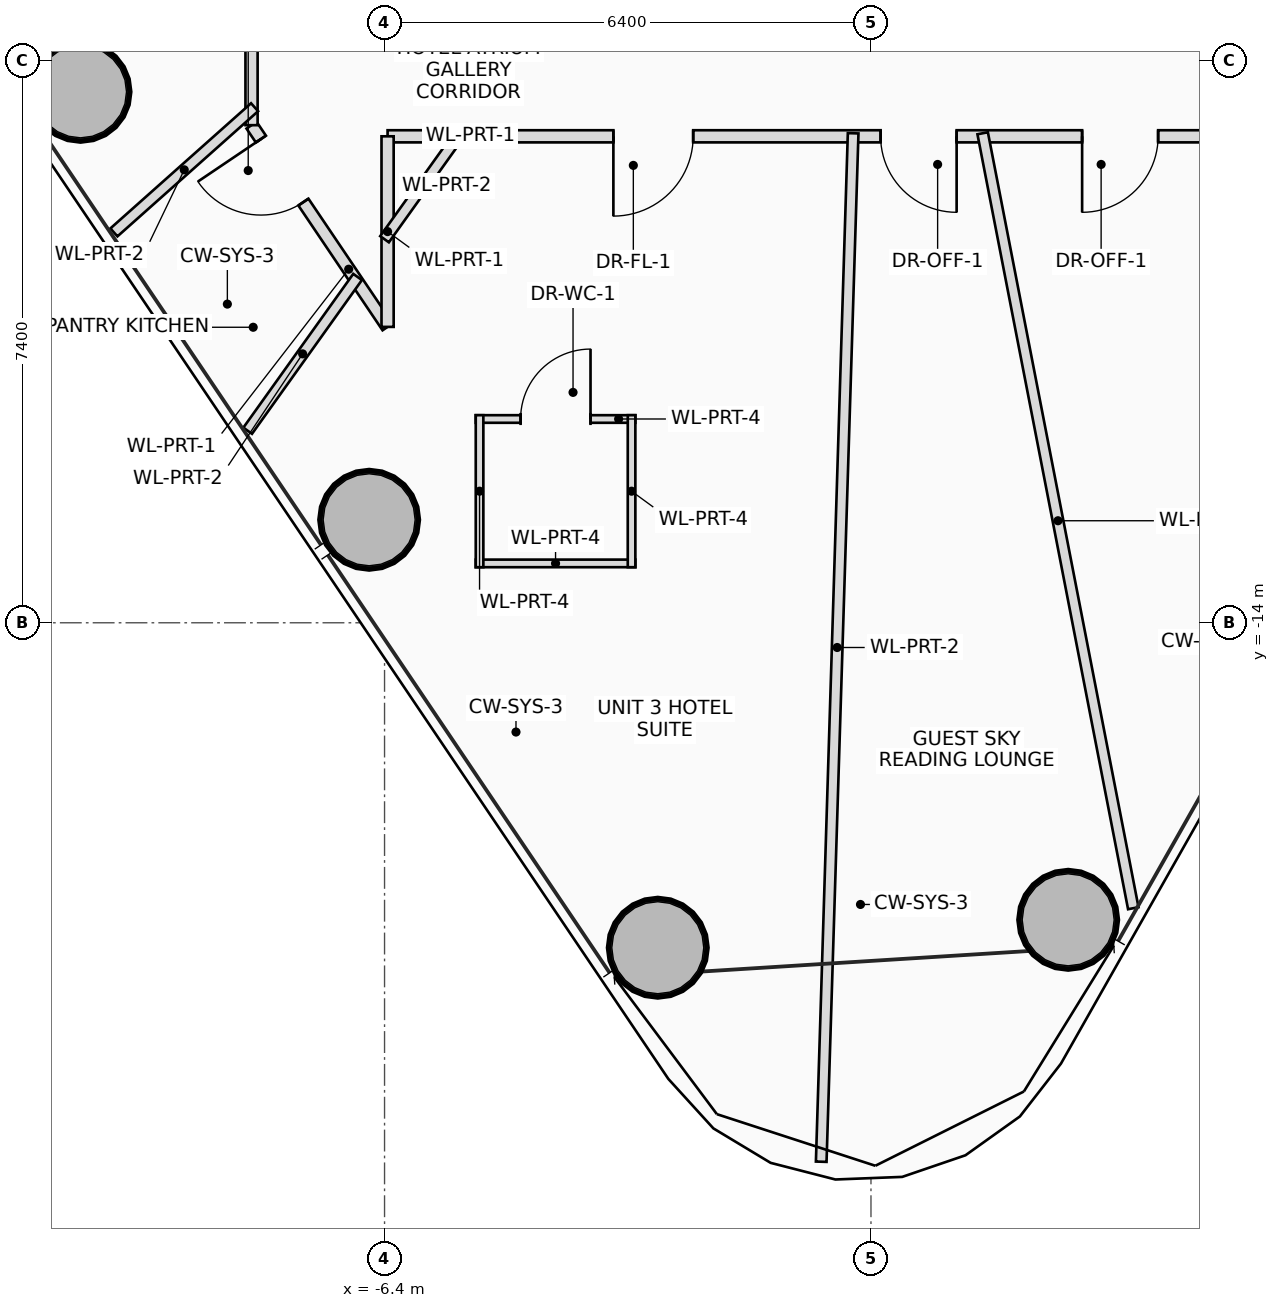
"""IFC4 building model, lengths in metres.
Left out: names, types, materials, properties, quantities, classifications, styles, units other than length and angle.
Written with IfcOpenShell. Run it as: python <this file> out.ifc"""

import sys

from ifc_helpers import new_model, si_unit, direction, frame, frame_2d, origin, origin_2d, place, context, subcontext, project, spatial, rectangle, hollow_circle, extrude, source, transform, mapped, element, fill, save


model = new_model("IFC4")
c1 = context("Model", 3, precision=1e-05, world=origin(), true_north=direction((0.0, 1.0)))
c2 = subcontext(c1, "Body", "Model", "MODEL_VIEW")
j1 = project(units=[si_unit("LENGTHUNIT", "METRE"), si_unit("PLANEANGLEUNIT", "RADIAN")], contexts=[c1])
p1 = place(None, origin())
s1 = spatial("IfcSite", under=j1, at=p1, CompositionType="ELEMENT")
p2 = place(p1, origin())
s2 = spatial("IfcBuilding", under=s1, at=p2, CompositionType="ELEMENT")
p3 = place(p2, frame((0.0, 0.0, 182.9)))
s3 = spatial("IfcBuildingStorey", under=s2, at=p3, CompositionType="ELEMENT", Elevation=182.9)
m1 = source(origin(), c2, "Body", "SweptSolid", [
    extrude(hollow_circle(Radius=0.65, WallThickness=0.045, at=origin_2d()), origin(), (0.0, 0.0, 1.0), 3.45),
])
for number, where, z_axis, x_axis in (
    (1, (2.595, -17.908, 0.0), (0.0, 0.0, 1.0), (1.0, 0.0, 0.0)),
    (2, (-10.4, -7.015, 0.0), (0.0, 0.0, 1.0), (1.0, 0.0, 0.0)),
    (3, (-6.603, -12.645, 0.0), (0.0, 0.0, 1.0), (1.0, 0.0, 0.0)),
    (4, (-2.805, -18.275, 0.0), (0.0, 0.0, 1.0), (1.0, 0.0, 0.0)),
):
    element("IfcColumn", number, at=place(p3, frame(where, z_axis=z_axis, x_axis=x_axis)), inside=s3, PredefinedType="COLUMN", context=c2, shape_type="MappedRepresentation", body=[
        mapped(m1, transform((0.0, 0.0, 0.0), scale=1.0)),
    ])
p4 = place(p3, frame((-5.2, -11.319, 0.0), z_axis=(0.0, 0.0, 1.0), x_axis=(1.0, 0.0, 0.0)))
e5 = element("IfcWall", 5, at=p4, inside=s3, PredefinedType="PARTITIONING", context=c2, shape_type="SweptSolid", body=[
    extrude(rectangle(XDim=2.1, YDim=0.1, at=frame_2d((1.05, 0.0))), origin(), (0.0, 0.0, 1.0), 2.565),
])
p5 = place(p4, frame((0.59, 0.0, 0.0)))
e6 = element("IfcOpeningElement", 6, at=p5, cuts=e5, PredefinedType="OPENING", context=c2, shape_type="SweptSolid", body=[
    extrude(rectangle(XDim=0.92, YDim=2.1, at=frame_2d((0.46, 1.05))), frame((0.0, 0.06, 0.0), z_axis=(0.0, -1.0, 0.0), x_axis=(1.0, 0.0, 0.0)), (0.0, 0.0, 1.0), 0.12),
])
p6 = place(p3, frame((-3.1, -13.219, 0.0), z_axis=(0.0, 0.0, 1.0), x_axis=(-1.0, 0.0, 0.0)))
e7 = element("IfcWall", 7, at=p6, inside=s3, PredefinedType="PARTITIONING", context=c2, shape_type="SweptSolid", body=[
    extrude(rectangle(XDim=2.1, YDim=0.1, at=frame_2d((1.05, 0.0))), origin(), (0.0, 0.0, 1.0), 2.565),
])
p7 = place(p3, frame((-3.15, -11.269, 0.0), z_axis=(0.0, 0.0, 1.0), x_axis=(0.0, -1.0, 0.0)))
e8 = element("IfcWall", 8, at=p7, inside=s3, PredefinedType="PARTITIONING", context=c2, shape_type="SweptSolid", body=[
    extrude(rectangle(XDim=2.0, YDim=0.1, at=frame_2d((1.0, 0.0))), origin(), (0.0, 0.0, 1.0), 2.765),
])
p8 = place(p3, frame((-5.15, -13.269, 0.0), z_axis=(0.0, 0.0, 1.0), x_axis=(0.0, 1.0, 0.0)))
e9 = element("IfcWall", 9, at=p8, inside=s3, PredefinedType="PARTITIONING", context=c2, shape_type="SweptSolid", body=[
    extrude(rectangle(XDim=2.0, YDim=0.1, at=frame_2d((1.0, 0.0))), origin(), (0.0, 0.0, 1.0), 3.21),
])
p9 = place(p3, frame((-6.36, -10.107, 0.0), z_axis=(0.0, 0.0, 1.0), x_axis=(-0.559145325895, 0.829069662049, 0.0)))
e10 = element("IfcWall", 10, at=p9, inside=s3, PredefinedType="PARTITIONING", context=c2, shape_type="SweptSolid", body=[
    extrude(rectangle(XDim=3.201, YDim=0.16, at=frame_2d((1.601, 0.0))), origin(), (0.0, 0.0, 1.0), 2.565),
])
p10 = place(p9, frame((1.981, 0.0, 0.0)))
e11 = element("IfcOpeningElement", 11, at=p10, cuts=e10, PredefinedType="OPENING", context=c2, shape_type="SweptSolid", body=[
    extrude(rectangle(XDim=1.0, YDim=2.25, at=frame_2d((0.5, 1.125))), frame((0.0, 0.09, 0.0), z_axis=(0.0, -1.0, 0.0), x_axis=(1.0, 0.0, 0.0)), (0.0, 0.0, 1.0), 0.18),
])
p11 = place(p3, frame((-8.15, -7.454, 0.0), z_axis=(0.0, 0.0, 1.0), x_axis=(0.0, 1.0, 0.0)))
e12 = element("IfcWall", 12, at=p11, inside=s3, PredefinedType="PARTITIONING", context=c2, shape_type="SweptSolid", body=[
    extrude(rectangle(XDim=15.054, YDim=0.16, at=frame_2d((7.527, 0.0))), origin(), (0.0, 0.0, 1.0), 2.565),
])
p12 = place(p11, frame((3.019, 0.0, 0.0)))
e13 = element("IfcOpeningElement", 13, at=p12, cuts=e12, PredefinedType="OPENING", context=c2, shape_type="SweptSolid", body=[
    extrude(rectangle(XDim=0.9, YDim=2.05, at=frame_2d((0.45, 1.025))), frame((0.0, 0.09, 0.0), z_axis=(0.0, -1.0, 0.0), x_axis=(1.0, 0.0, 0.0)), (0.0, 0.0, 1.0), 0.18),
])
p13 = place(p11, frame((7.172, 0.0, 0.0)))
e14 = element("IfcOpeningElement", 14, at=p13, cuts=e12, PredefinedType="OPENING", context=c2, shape_type="SweptSolid", body=[
    extrude(rectangle(XDim=1.0, YDim=2.25, at=frame_2d((0.5, 1.125))), frame((0.0, 0.09, 0.0), z_axis=(0.0, -1.0, 0.0), x_axis=(1.0, 0.0, 0.0)), (0.0, 0.0, 1.0), 0.18),
])
p14 = place(p11, frame((10.563, 0.0, 0.0)))
e15 = element("IfcOpeningElement", 15, at=p14, cuts=e12, PredefinedType="OPENING", context=c2, shape_type="SweptSolid", body=[
    extrude(rectangle(XDim=1.05, YDim=2.2, at=frame_2d((0.525, 1.1))), frame((0.0, 0.09, 0.0), z_axis=(0.0, -1.0, 0.0), x_axis=(1.0, 0.0, 0.0)), (0.0, 0.0, 1.0), 0.18),
])
p15 = place(p3, frame((5.25, -7.6, 0.0), z_axis=(0.0, 0.0, 1.0), x_axis=(-1.0, 0.0, 0.0)))
e16 = element("IfcWall", 16, at=p15, inside=s3, PredefinedType="PARTITIONING", context=c2, shape_type="SweptSolid", body=[
    extrude(rectangle(XDim=11.61, YDim=0.16, at=frame_2d((5.805, 0.0))), origin(), (0.0, 0.0, 1.0), 2.565),
])
p16 = place(p15, frame((1.472, 0.0, 0.0)))
e17 = element("IfcOpeningElement", 17, at=p16, cuts=e16, PredefinedType="OPENING", context=c2, shape_type="SweptSolid", body=[
    extrude(rectangle(XDim=1.0, YDim=2.25, at=frame_2d((0.5, 1.125))), frame((0.0, 0.09, 0.0), z_axis=(0.0, -1.0, 0.0), x_axis=(1.0, 0.0, 0.0)), (0.0, 0.0, 1.0), 0.18),
])
p17 = place(p15, frame((4.123, 0.0, 0.0)))
e18 = element("IfcOpeningElement", 18, at=p17, cuts=e16, PredefinedType="OPENING", context=c2, shape_type="SweptSolid", body=[
    extrude(rectangle(XDim=1.0, YDim=2.25, at=frame_2d((0.5, 1.125))), frame((0.0, 0.09, 0.0), z_axis=(0.0, -1.0, 0.0), x_axis=(1.0, 0.0, 0.0)), (0.0, 0.0, 1.0), 0.18),
])
p18 = place(p15, frame((7.589, 0.0, 0.0)))
e19 = element("IfcOpeningElement", 19, at=p18, cuts=e16, PredefinedType="OPENING", context=c2, shape_type="SweptSolid", body=[
    extrude(rectangle(XDim=1.05, YDim=2.2, at=frame_2d((0.525, 1.1))), frame((0.0, 0.09, 0.0), z_axis=(0.0, -1.0, 0.0), x_axis=(1.0, 0.0, 0.0)), (0.0, 0.0, 1.0), 0.18),
])
p19 = place(p3, frame((-6.36, -7.6, 0.0), z_axis=(0.0, 0.0, 1.0), x_axis=(0.0, -1.0, 0.0)))
e20 = element("IfcWall", 20, at=p19, inside=s3, PredefinedType="PARTITIONING", context=c2, shape_type="SweptSolid", body=[
    extrude(rectangle(XDim=2.507, YDim=0.16, at=frame_2d((1.254, 0.0))), origin(), (0.0, 0.0, 1.0), 2.565),
])
p20 = place(p3, frame((-8.11, -7.217, 0.0), z_axis=(0.0, 0.0, 1.0), x_axis=(-0.747006826924, -0.66481636602, 0.0)))
e21 = element("IfcWall", 21, at=p20, inside=s3, PredefinedType="PARTITIONING", context=c2, shape_type="SweptSolid", body=[
    extrude(rectangle(XDim=2.477, YDim=0.14, at=frame_2d((1.239, 0.0))), origin(), (0.0, 0.0, 1.0), 2.725),
])
p21 = place(p3, frame((-5.404, -7.56, 0.0), z_axis=(0.0, 0.0, 1.0), x_axis=(-0.581467296449, -0.813569777683, 0.0)))
e22 = element("IfcWall", 22, at=p21, inside=s3, PredefinedType="PARTITIONING", context=c2, shape_type="SweptSolid", body=[
    extrude(rectangle(XDim=1.713, YDim=0.14, at=frame_2d((0.857, 0.0))), origin(), (0.0, 0.0, 1.0), 2.565),
])
p22 = place(p3, frame((-6.755, -9.45, 0.0), z_axis=(0.0, 0.0, 1.0), x_axis=(-0.581461082044, -0.813574219152, 0.0)))
e23 = element("IfcWall", 23, at=p22, inside=s3, PredefinedType="PARTITIONING", context=c2, shape_type="SweptSolid", body=[
    extrude(rectangle(XDim=2.487, YDim=0.14, at=frame_2d((1.243, 0.0))), origin(), (0.0, 0.0, 1.0), 2.725),
])
p23 = place(p3, frame((-0.235, -7.56, 0.0), z_axis=(0.0, 0.0, 1.0), x_axis=(-0.031020231712, -0.999518756815, 0.0)))
e24 = element("IfcWall", 24, at=p23, inside=s3, PredefinedType="PARTITIONING", context=c2, shape_type="SweptSolid", body=[
    extrude(rectangle(XDim=13.537, YDim=0.14, at=frame_2d((6.769, 0.0))), origin(), (0.0, 0.0, 1.0), 2.725),
])
p24 = place(p3, frame((1.469, -7.56, 0.0), z_axis=(0.0, 0.0, 1.0), x_axis=(0.190824358974, -0.981624196942, 0.0)))
e25 = element("IfcWall", 25, at=p24, inside=s3, PredefinedType="PARTITIONING", context=c2, shape_type="SweptSolid", body=[
    extrude(rectangle(XDim=10.386, YDim=0.14, at=frame_2d((5.193, 0.0))), origin(), (0.0, 0.0, 1.0), 2.565),
])
p25 = place(p5, origin())
e26 = element("IfcDoor", 26, at=p25, inside=s3, OperationType="SINGLE_SWING_RIGHT", PredefinedType="DOOR", context=c2, shape_type="SweptSolid", body=[
    extrude(rectangle(XDim=0.92, YDim=2.1, at=frame_2d((0.46, 1.05))), frame((0.0, 0.025, 0.0), z_axis=(0.0, -1.0, 0.0), x_axis=(1.0, 0.0, 0.0)), (0.0, 0.0, 1.0), 0.05),
])
fill(e6, e26)
p26 = place(p10, origin())
e27 = element("IfcDoor", 27, at=p26, inside=s3, OperationType="SINGLE_SWING_RIGHT", PredefinedType="DOOR", context=c2, shape_type="SweptSolid", body=[
    extrude(rectangle(XDim=1.0, YDim=2.25, at=frame_2d((0.5, 1.125))), frame((0.0, 0.025, 0.0), z_axis=(0.0, -1.0, 0.0), x_axis=(1.0, 0.0, 0.0)), (0.0, 0.0, 1.0), 0.05),
])
fill(e11, e27)
p27 = place(p16, origin())
e28 = element("IfcDoor", 28, at=p27, inside=s3, OperationType="SINGLE_SWING_RIGHT", PredefinedType="DOOR", context=c2, shape_type="SweptSolid", body=[
    extrude(rectangle(XDim=1.0, YDim=2.25, at=frame_2d((0.5, 1.125))), frame((0.0, 0.025, 0.0), z_axis=(0.0, -1.0, 0.0), x_axis=(1.0, 0.0, 0.0)), (0.0, 0.0, 1.0), 0.05),
])
fill(e17, e28)
p28 = place(p17, origin())
e29 = element("IfcDoor", 29, at=p28, inside=s3, OperationType="SINGLE_SWING_LEFT", PredefinedType="DOOR", context=c2, shape_type="SweptSolid", body=[
    extrude(rectangle(XDim=1.0, YDim=2.25, at=frame_2d((0.5, 1.125))), frame((0.0, 0.025, 0.0), z_axis=(0.0, -1.0, 0.0), x_axis=(1.0, 0.0, 0.0)), (0.0, 0.0, 1.0), 0.05),
])
fill(e18, e29)
p29 = place(p18, origin())
e30 = element("IfcDoor", 30, at=p29, inside=s3, OperationType="SINGLE_SWING_RIGHT", PredefinedType="DOOR", context=c2, shape_type="SweptSolid", body=[
    extrude(rectangle(XDim=1.05, YDim=2.2, at=frame_2d((0.525, 1.1))), frame((0.0, 0.025, 0.0), z_axis=(0.0, -1.0, 0.0), x_axis=(1.0, 0.0, 0.0)), (0.0, 0.0, 1.0), 0.05),
])
fill(e19, e30)
save(model, sys.argv[1])
